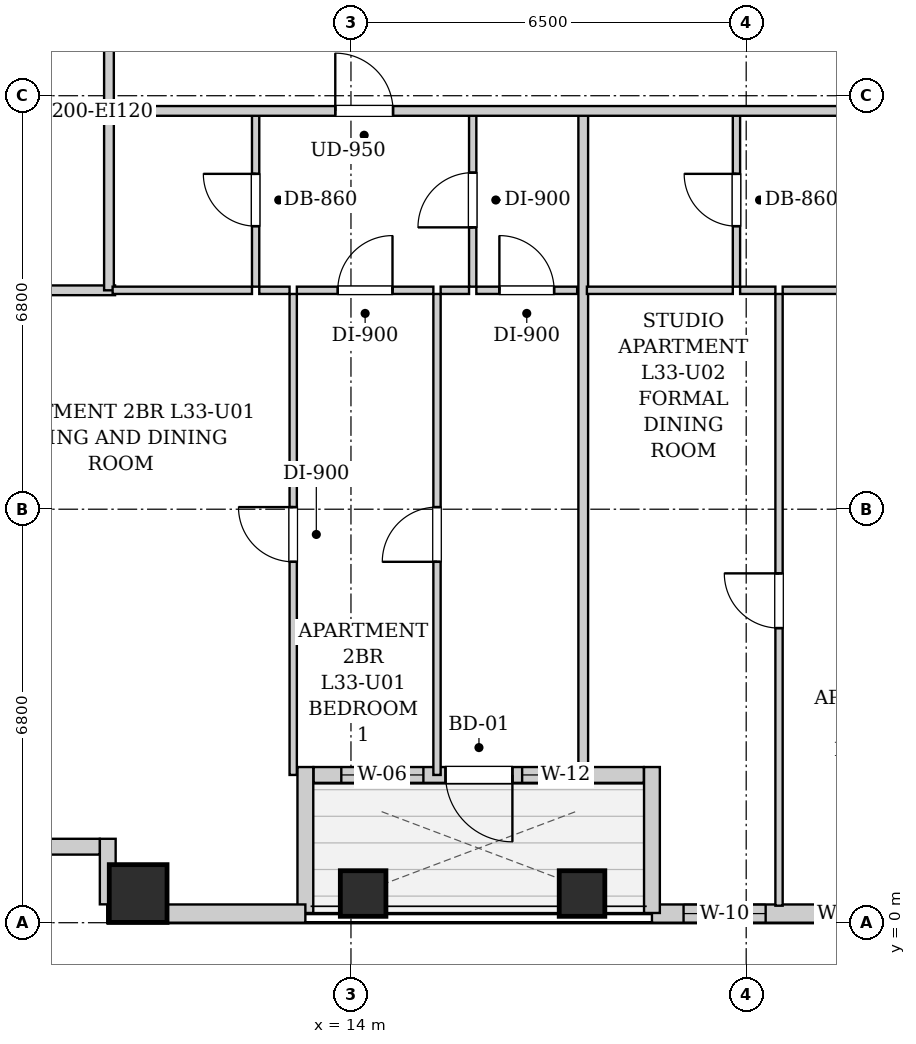
"""IFC4 building model, lengths in metres.
Left out: names, types, materials, properties, quantities, classifications, styles, units other than length and angle.
Written with IfcOpenShell. Run it as: python <this file> out.ifc"""

import sys

from ifc_helpers import new_model, si_unit, direction, frame, frame_2d, origin, origin_2d, place, context, subcontext, project, spatial, rectangle, extrude, element, fill, save


model = new_model("IFC4")
c1 = context("Model", 3, precision=1e-05, world=origin(), true_north=direction((0.0, 1.0)))
c2 = subcontext(c1, "Body", "Model", "MODEL_VIEW")
j1 = project(units=[si_unit("LENGTHUNIT", "METRE"), si_unit("PLANEANGLEUNIT", "RADIAN")], contexts=[c1])
p1 = place(None, origin())
s1 = spatial("IfcSite", under=j1, at=p1, CompositionType="ELEMENT")
p2 = place(p1, origin())
s2 = spatial("IfcBuilding", under=s1, at=p2, CompositionType="ELEMENT")
p3 = place(p2, frame((0.0, 0.0, 116.7)))
s3 = spatial("IfcBuildingStorey", under=s2, at=p3, CompositionType="ELEMENT", Elevation=116.7)
p4 = place(p3, frame((10.5, 0.48, 0.0), z_axis=(0.0, 0.0, 1.0), x_axis=(1.0, 0.0, 0.0)))
e1 = element("IfcColumn", 1, at=p4, inside=s3, PredefinedType="COLUMN", context=c2, shape_type="SweptSolid", body=[
    extrude(rectangle(XDim=0.95, YDim=0.95, at=origin_2d()), origin(), (0.0, 0.0, 1.0), 3.2),
])
for number, where, z_axis, x_axis in (
    (2, (14.2, 0.48, 0.0), (0.0, 0.0, 1.0), (1.0, 0.0, 0.0)),
    (3, (17.8, 0.48, 0.0), (0.0, 0.0, 1.0), (1.0, 0.0, 0.0)),
):
    element("IfcColumn", number, at=place(p3, frame(where, z_axis=z_axis, x_axis=x_axis)), inside=s3, PredefinedType="COLUMN", context=c2, shape_type="SweptSolid", body=[
        extrude(rectangle(XDim=0.75, YDim=0.75, at=origin_2d()), origin(), (0.0, 0.0, 1.0), 3.2),
    ])
p5 = place(p3, frame((40.9, 0.15, 0.0), z_axis=(0.0, 0.0, 1.0), x_axis=(-1.0, 0.0, 0.0)))
e4 = element("IfcWall", 4, at=p5, inside=s3, PredefinedType="SOLIDWALL", context=c2, shape_type="SweptSolid", body=[
    extrude(rectangle(XDim=21.95, YDim=0.3, at=frame_2d((10.975, 0.0))), origin(), (0.0, 0.0, 1.0), 2.88),
])
p6 = place(p5, frame((20.08, 0.0, 0.55)))
e5 = element("IfcOpeningElement", 5, at=p6, cuts=e4, PredefinedType="OPENING", context=c2, shape_type="SweptSolid", body=[
    extrude(rectangle(XDim=1.35, YDim=1.2, at=frame_2d((0.675, 0.6))), frame((0.0, 0.16, 0.0), z_axis=(0.0, -1.0, 0.0), x_axis=(1.0, 0.0, 0.0)), (0.0, 0.0, 1.0), 0.32),
])
p7 = place(p5, frame((18.4, 0.0, 0.55)))
e6 = element("IfcOpeningElement", 6, at=p7, cuts=e4, PredefinedType="OPENING", context=c2, shape_type="SweptSolid", body=[
    extrude(rectangle(XDim=0.85, YDim=1.2, at=frame_2d((0.425, 0.6))), frame((0.0, 0.16, 0.0), z_axis=(0.0, -1.0, 0.0), x_axis=(1.0, 0.0, 0.0)), (0.0, 0.0, 1.0), 0.32),
])
p8 = place(p5, frame((11.127, 0.0, 0.55)))
e7 = element("IfcOpeningElement", 7, at=p8, cuts=e4, PredefinedType="OPENING", context=c2, shape_type="SweptSolid", body=[
    extrude(rectangle(XDim=1.35, YDim=1.2, at=frame_2d((0.675, 0.6))), frame((0.0, 0.16, 0.0), z_axis=(0.0, -1.0, 0.0), x_axis=(1.0, 0.0, 0.0)), (0.0, 0.0, 1.0), 0.32),
])
p9 = place(p5, frame((8.235, 0.0, 0.55)))
e8 = element("IfcOpeningElement", 8, at=p9, cuts=e4, PredefinedType="OPENING", context=c2, shape_type="SweptSolid", body=[
    extrude(rectangle(XDim=1.35, YDim=1.2, at=frame_2d((0.675, 0.6))), frame((0.0, 0.16, 0.0), z_axis=(0.0, -1.0, 0.0), x_axis=(1.0, 0.0, 0.0)), (0.0, 0.0, 1.0), 0.32),
])
p10 = place(p5, frame((4.835, 0.0, 0.55)))
e9 = element("IfcOpeningElement", 9, at=p10, cuts=e4, PredefinedType="OPENING", context=c2, shape_type="SweptSolid", body=[
    extrude(rectangle(XDim=1.35, YDim=1.2, at=frame_2d((0.675, 0.6))), frame((0.0, 0.16, 0.0), z_axis=(0.0, -1.0, 0.0), x_axis=(1.0, 0.0, 0.0)), (0.0, 0.0, 1.0), 0.32),
])
p11 = place(p3, frame((18.95, 0.16, 0.0), z_axis=(0.0, 0.0, 1.0), x_axis=(0.0, 1.0, 0.0)))
e10 = element("IfcWall", 10, at=p11, inside=s3, PredefinedType="SOLIDWALL", context=c2, shape_type="SweptSolid", body=[
    extrude(rectangle(XDim=2.4, YDim=0.26, at=frame_2d((1.2, 0.0))), origin(), (0.0, 0.0, 1.0), 2.88),
])
p12 = place(p3, frame((18.816, 2.43, 0.0), z_axis=(0.0, 0.0, 1.0), x_axis=(-1.0, 0.0, 0.0)))
e11 = element("IfcWall", 11, at=p12, inside=s3, PredefinedType="SOLIDWALL", context=c2, shape_type="SweptSolid", body=[
    extrude(rectangle(XDim=5.432, YDim=0.26, at=frame_2d((2.716, 0.0))), origin(), (0.0, 0.0, 1.0), 2.88),
])
p13 = place(p12, frame((2.161, 0.0, 0.0)))
e12 = element("IfcOpeningElement", 12, at=p13, cuts=e11, PredefinedType="OPENING", context=c2, shape_type="SweptSolid", body=[
    extrude(rectangle(XDim=1.1, YDim=2.0, at=frame_2d((0.55, 1.0))), frame((0.0, 0.14, 0.0), z_axis=(0.0, -1.0, 0.0), x_axis=(1.0, 0.0, 0.0)), (0.0, 0.0, 1.0), 0.28),
])
p14 = place(p12, frame((3.625, 0.0, 0.85)))
e13 = element("IfcOpeningElement", 13, at=p14, cuts=e11, PredefinedType="OPENING", context=c2, shape_type="SweptSolid", body=[
    extrude(rectangle(XDim=1.35, YDim=1.65, at=frame_2d((0.675, 0.825))), frame((0.0, 0.14, 0.0), z_axis=(0.0, -1.0, 0.0), x_axis=(1.0, 0.0, 0.0)), (0.0, 0.0, 1.0), 0.28),
])
p15 = place(p12, frame((1.321, 0.0, 0.55)))
e14 = element("IfcOpeningElement", 14, at=p15, cuts=e11, PredefinedType="OPENING", context=c2, shape_type="SweptSolid", body=[
    extrude(rectangle(XDim=0.68, YDim=1.2, at=frame_2d((0.34, 0.6))), frame((0.0, 0.14, 0.0), z_axis=(0.0, -1.0, 0.0), x_axis=(1.0, 0.0, 0.0)), (0.0, 0.0, 1.0), 0.28),
])
p16 = place(p3, frame((13.25, 2.56, 0.0), z_axis=(0.0, 0.0, 1.0), x_axis=(0.0, -1.0, 0.0)))
e15 = element("IfcWall", 15, at=p16, inside=s3, PredefinedType="SOLIDWALL", context=c2, shape_type="SweptSolid", body=[
    extrude(rectangle(XDim=2.4, YDim=0.26, at=frame_2d((1.2, 0.0))), origin(), (0.0, 0.0, 1.0), 2.88),
])
p17 = place(p3, frame((13.25, 0.15, 0.0), z_axis=(0.0, 0.0, 1.0), x_axis=(-1.0, 0.0, 0.0)))
e16 = element("IfcWall", 16, at=p17, inside=s3, PredefinedType="SOLIDWALL", context=c2, shape_type="SweptSolid", body=[
    extrude(rectangle(XDim=3.25, YDim=0.3, at=frame_2d((1.625, 0.0))), origin(), (0.0, 0.0, 1.0), 2.88),
])
p18 = place(p3, frame((10.0, 0.302, 0.0), z_axis=(0.0, 0.0, 1.0), x_axis=(0.0, 1.0, 0.0)))
e17 = element("IfcWall", 17, at=p18, inside=s3, PredefinedType="SOLIDWALL", context=c2, shape_type="SweptSolid", body=[
    extrude(rectangle(XDim=1.078, YDim=0.26, at=frame_2d((0.539, 0.0))), origin(), (0.0, 0.0, 1.0), 2.88),
])
p19 = place(p3, frame((9.868, 1.25, 0.0), z_axis=(0.0, 0.0, 1.0), x_axis=(-1.0, 0.0, 0.0)))
e18 = element("IfcWall", 18, at=p19, inside=s3, PredefinedType="SOLIDWALL", context=c2, shape_type="SweptSolid", body=[
    extrude(rectangle(XDim=1.248, YDim=0.26, at=frame_2d((0.624, 0.0))), origin(), (0.0, 0.0, 1.0), 2.88),
])
p20 = place(p3, frame((10.02, 13.35, 0.0), z_axis=(0.0, 0.0, 1.0), x_axis=(0.0, 1.0, 0.0)))
e19 = element("IfcWall", 19, at=p20, inside=s3, PredefinedType="PARTITIONING", context=c2, shape_type="SweptSolid", body=[
    extrude(rectangle(XDim=1.74, YDim=0.16, at=frame_2d((0.87, 0.0))), origin(), (0.0, 0.0, 1.0), 2.88),
])
p21 = place(p3, frame((7.78, 10.4, 0.0), z_axis=(0.0, 0.0, 1.0), x_axis=(1.0, 0.0, 0.0)))
e20 = element("IfcWall", 20, at=p21, inside=s3, PredefinedType="PARTITIONING", context=c2, shape_type="SweptSolid", body=[
    extrude(rectangle(XDim=2.34, YDim=0.16, at=frame_2d((1.17, 0.0))), origin(), (0.0, 0.0, 1.0), 2.88),
])
p22 = place(p3, frame((10.02, 10.4, 0.0), z_axis=(0.0, 0.0, 1.0), x_axis=(0.0, 1.0, 0.0)))
e21 = element("IfcWall", 21, at=p22, inside=s3, PredefinedType="PARTITIONING", context=c2, shape_type="SweptSolid", body=[
    extrude(rectangle(XDim=2.91, YDim=0.16, at=frame_2d((1.455, 0.0))), origin(), (0.0, 0.0, 1.0), 2.88),
])
p23 = place(p3, frame((12.432, 10.46, 0.0), z_axis=(0.0, 0.0, 1.0), x_axis=(0.0, 1.0, 0.0)))
e22 = element("IfcWall", 22, at=p23, inside=s3, PredefinedType="PARTITIONING", context=c2, shape_type="SweptSolid", body=[
    extrude(rectangle(XDim=2.85, YDim=0.12, at=frame_2d((1.425, 0.0))), origin(), (0.0, 0.0, 1.0), 2.88),
])
p24 = place(p23, frame((0.995, 0.0, 0.0)))
e23 = element("IfcOpeningElement", 23, at=p24, cuts=e22, PredefinedType="OPENING", context=c2, shape_type="SweptSolid", body=[
    extrude(rectangle(XDim=0.86, YDim=2.05, at=frame_2d((0.43, 1.025))), frame((0.0, 0.07, 0.0), z_axis=(0.0, -1.0, 0.0), x_axis=(1.0, 0.0, 0.0)), (0.0, 0.0, 1.0), 0.14),
])
p25 = place(p3, frame((10.08, 10.4, 0.0), z_axis=(0.0, 0.0, 1.0), x_axis=(1.0, 0.0, 0.0)))
e24 = element("IfcWall", 24, at=p25, inside=s3, PredefinedType="PARTITIONING", context=c2, shape_type="SweptSolid", body=[
    extrude(rectangle(XDim=2.292, YDim=0.12, at=frame_2d((1.146, 0.0))), origin(), (0.0, 0.0, 1.0), 2.88),
])
p26 = place(p3, frame((16.002, 10.46, 0.0), z_axis=(0.0, 0.0, 1.0), x_axis=(0.0, 1.0, 0.0)))
e25 = element("IfcWall", 25, at=p26, inside=s3, PredefinedType="PARTITIONING", context=c2, shape_type="SweptSolid", body=[
    extrude(rectangle(XDim=2.85, YDim=0.12, at=frame_2d((1.425, 0.0))), origin(), (0.0, 0.0, 1.0), 2.88),
])
p27 = place(p26, frame((0.975, 0.0, 0.0)))
e26 = element("IfcOpeningElement", 26, at=p27, cuts=e25, PredefinedType="OPENING", context=c2, shape_type="SweptSolid", body=[
    extrude(rectangle(XDim=0.9, YDim=2.05, at=frame_2d((0.45, 1.025))), frame((0.0, 0.07, 0.0), z_axis=(0.0, -1.0, 0.0), x_axis=(1.0, 0.0, 0.0)), (0.0, 0.0, 1.0), 0.14),
])
p28 = place(p3, frame((12.492, 10.4, 0.0), z_axis=(0.0, 0.0, 1.0), x_axis=(1.0, 0.0, 0.0)))
e27 = element("IfcWall", 27, at=p28, inside=s3, PredefinedType="PARTITIONING", context=c2, shape_type="SweptSolid", body=[
    extrude(rectangle(XDim=0.498, YDim=0.12, at=frame_2d((0.249, 0.0))), origin(), (0.0, 0.0, 1.0), 2.88),
])
p29 = place(p3, frame((13.11, 10.4, 0.0), z_axis=(0.0, 0.0, 1.0), x_axis=(1.0, 0.0, 0.0)))
e28 = element("IfcWall", 28, at=p29, inside=s3, PredefinedType="PARTITIONING", context=c2, shape_type="SweptSolid", body=[
    extrude(rectangle(XDim=2.245, YDim=0.12, at=frame_2d((1.123, 0.0))), origin(), (0.0, 0.0, 1.0), 2.88),
])
p30 = place(p29, frame((0.673, 0.0, 0.0)))
e29 = element("IfcOpeningElement", 29, at=p30, cuts=e28, PredefinedType="OPENING", context=c2, shape_type="SweptSolid", body=[
    extrude(rectangle(XDim=0.9, YDim=2.05, at=frame_2d((0.45, 1.025))), frame((0.0, 0.07, 0.0), z_axis=(0.0, -1.0, 0.0), x_axis=(1.0, 0.0, 0.0)), (0.0, 0.0, 1.0), 0.14),
])
p31 = place(p3, frame((15.475, 10.4, 0.0), z_axis=(0.0, 0.0, 1.0), x_axis=(1.0, 0.0, 0.0)))
e30 = element("IfcWall", 30, at=p31, inside=s3, PredefinedType="PARTITIONING", context=c2, shape_type="SweptSolid", body=[
    extrude(rectangle(XDim=0.467, YDim=0.12, at=frame_2d((0.233, 0.0))), origin(), (0.0, 0.0, 1.0), 2.88),
])
p32 = place(p3, frame((16.062, 10.4, 0.0), z_axis=(0.0, 0.0, 1.0), x_axis=(1.0, 0.0, 0.0)))
e31 = element("IfcWall", 31, at=p32, inside=s3, PredefinedType="PARTITIONING", context=c2, shape_type="SweptSolid", body=[
    extrude(rectangle(XDim=1.658, YDim=0.12, at=frame_2d((0.829, 0.0))), origin(), (0.0, 0.0, 1.0), 2.88),
])
p33 = place(p32, frame((0.379, 0.0, 0.0)))
e32 = element("IfcOpeningElement", 32, at=p33, cuts=e31, PredefinedType="OPENING", context=c2, shape_type="SweptSolid", body=[
    extrude(rectangle(XDim=0.9, YDim=2.05, at=frame_2d((0.45, 1.025))), frame((0.0, 0.07, 0.0), z_axis=(0.0, -1.0, 0.0), x_axis=(1.0, 0.0, 0.0)), (0.0, 0.0, 1.0), 0.14),
])
p34 = place(p3, frame((13.05, 2.43, 0.0), z_axis=(0.0, 0.0, 1.0), x_axis=(0.0, 1.0, 0.0)))
e33 = element("IfcWall", 33, at=p34, inside=s3, PredefinedType="PARTITIONING", context=c2, shape_type="SweptSolid", body=[
    extrude(rectangle(XDim=7.91, YDim=0.12, at=frame_2d((3.955, 0.0))), origin(), (0.0, 0.0, 1.0), 2.88),
])
p35 = place(p34, frame((3.505, 0.0, 0.0)))
e34 = element("IfcOpeningElement", 34, at=p35, cuts=e33, PredefinedType="OPENING", context=c2, shape_type="SweptSolid", body=[
    extrude(rectangle(XDim=0.9, YDim=2.05, at=frame_2d((0.45, 1.025))), frame((0.0, 0.07, 0.0), z_axis=(0.0, -1.0, 0.0), x_axis=(1.0, 0.0, 0.0)), (0.0, 0.0, 1.0), 0.14),
])
p36 = place(p3, frame((15.415, 2.43, 0.0), z_axis=(0.0, 0.0, 1.0), x_axis=(0.0, 1.0, 0.0)))
e35 = element("IfcWall", 35, at=p36, inside=s3, PredefinedType="PARTITIONING", context=c2, shape_type="SweptSolid", body=[
    extrude(rectangle(XDim=7.91, YDim=0.12, at=frame_2d((3.955, 0.0))), origin(), (0.0, 0.0, 1.0), 2.88),
])
p37 = place(p36, frame((3.505, 0.0, 0.0)))
e36 = element("IfcOpeningElement", 36, at=p37, cuts=e35, PredefinedType="OPENING", context=c2, shape_type="SweptSolid", body=[
    extrude(rectangle(XDim=0.9, YDim=2.05, at=frame_2d((0.45, 1.025))), frame((0.0, 0.07, 0.0), z_axis=(0.0, -1.0, 0.0), x_axis=(1.0, 0.0, 0.0)), (0.0, 0.0, 1.0), 0.14),
])
p38 = place(p3, frame((17.82, 2.26, 0.0), z_axis=(0.0, 0.0, 1.0), x_axis=(0.0, 1.0, 0.0)))
e37 = element("IfcWall", 37, at=p38, inside=s3, PredefinedType="PARTITIONING", context=c2, shape_type="SweptSolid", body=[
    extrude(rectangle(XDim=11.05, YDim=0.16, at=frame_2d((5.525, 0.0))), origin(), (0.0, 0.0, 1.0), 2.253),
])
p39 = place(p3, frame((20.34, 10.46, 0.0), z_axis=(0.0, 0.0, 1.0), x_axis=(0.0, 1.0, 0.0)))
e38 = element("IfcWall", 38, at=p39, inside=s3, PredefinedType="PARTITIONING", context=c2, shape_type="SweptSolid", body=[
    extrude(rectangle(XDim=2.85, YDim=0.12, at=frame_2d((1.425, 0.0))), origin(), (0.0, 0.0, 1.0), 2.88),
])
p40 = place(p39, frame((0.995, 0.0, 0.0)))
e39 = element("IfcOpeningElement", 39, at=p40, cuts=e38, PredefinedType="OPENING", context=c2, shape_type="SweptSolid", body=[
    extrude(rectangle(XDim=0.86, YDim=2.05, at=frame_2d((0.43, 1.025))), frame((0.0, 0.07, 0.0), z_axis=(0.0, -1.0, 0.0), x_axis=(1.0, 0.0, 0.0)), (0.0, 0.0, 1.0), 0.14),
])
p41 = place(p3, frame((17.88, 10.4, 0.0), z_axis=(0.0, 0.0, 1.0), x_axis=(1.0, 0.0, 0.0)))
e40 = element("IfcWall", 40, at=p41, inside=s3, PredefinedType="PARTITIONING", context=c2, shape_type="SweptSolid", body=[
    extrude(rectangle(XDim=2.4, YDim=0.12, at=frame_2d((1.2, 0.0))), origin(), (0.0, 0.0, 1.0), 2.88),
])
p42 = place(p3, frame((20.4, 10.4, 0.0), z_axis=(0.0, 0.0, 1.0), x_axis=(1.0, 0.0, 0.0)))
e41 = element("IfcWall", 41, at=p42, inside=s3, PredefinedType="PARTITIONING", context=c2, shape_type="SweptSolid", body=[
    extrude(rectangle(XDim=0.58, YDim=0.12, at=frame_2d((0.29, 0.0))), origin(), (0.0, 0.0, 1.0), 2.88),
])
p43 = place(p3, frame((21.1, 10.4, 0.0), z_axis=(0.0, 0.0, 1.0), x_axis=(1.0, 0.0, 0.0)))
e42 = element("IfcWall", 42, at=p43, inside=s3, PredefinedType="PARTITIONING", context=c2, shape_type="SweptSolid", body=[
    extrude(rectangle(XDim=3.1, YDim=0.12, at=frame_2d((1.55, 0.0))), origin(), (0.0, 0.0, 1.0), 2.88),
])
p44 = place(p43, frame((1.1, 0.0, 0.0)))
e43 = element("IfcOpeningElement", 43, at=p44, cuts=e42, PredefinedType="OPENING", context=c2, shape_type="SweptSolid", body=[
    extrude(rectangle(XDim=0.9, YDim=2.05, at=frame_2d((0.45, 1.025))), frame((0.0, 0.07, 0.0), z_axis=(0.0, -1.0, 0.0), x_axis=(1.0, 0.0, 0.0)), (0.0, 0.0, 1.0), 0.14),
])
p45 = place(p3, frame((21.04, 0.28, 0.0), z_axis=(0.0, 0.0, 1.0), x_axis=(0.0, 1.0, 0.0)))
e44 = element("IfcWall", 44, at=p45, inside=s3, PredefinedType="PARTITIONING", context=c2, shape_type="SweptSolid", body=[
    extrude(rectangle(XDim=10.06, YDim=0.12, at=frame_2d((5.03, 0.0))), origin(), (0.0, 0.0, 1.0), 2.88),
])
p46 = place(p45, frame((4.565, 0.0, 0.0)))
e45 = element("IfcOpeningElement", 45, at=p46, cuts=e44, PredefinedType="OPENING", context=c2, shape_type="SweptSolid", body=[
    extrude(rectangle(XDim=0.9, YDim=2.05, at=frame_2d((0.45, 1.025))), frame((0.0, 0.07, 0.0), z_axis=(0.0, -1.0, 0.0), x_axis=(1.0, 0.0, 0.0)), (0.0, 0.0, 1.0), 0.14),
])
p47 = place(p3, frame((10.05, 13.35, 0.0), z_axis=(0.0, 0.0, 1.0), x_axis=(1.0, 0.0, 0.0)))
e46 = element("IfcWall", 46, at=p47, inside=s3, PredefinedType="PARTITIONING", context=c2, shape_type="SweptSolid", body=[
    extrude(rectangle(XDim=30.8, YDim=0.16, at=frame_2d((15.4, 0.0))), origin(), (0.0, 0.0, 1.0), 2.88),
])
p48 = place(p47, frame((3.692, 0.0, 0.0)))
e47 = element("IfcOpeningElement", 47, at=p48, cuts=e46, PredefinedType="OPENING", context=c2, shape_type="SweptSolid", body=[
    extrude(rectangle(XDim=0.95, YDim=2.1, at=frame_2d((0.475, 1.05))), frame((0.0, 0.09, 0.0), z_axis=(0.0, -1.0, 0.0), x_axis=(1.0, 0.0, 0.0)), (0.0, 0.0, 1.0), 0.18),
])
p49 = place(p47, frame((12.095, 0.0, 0.0)))
e48 = element("IfcOpeningElement", 48, at=p49, cuts=e46, PredefinedType="OPENING", context=c2, shape_type="SweptSolid", body=[
    extrude(rectangle(XDim=0.95, YDim=2.1, at=frame_2d((0.475, 1.05))), frame((0.0, 0.09, 0.0), z_axis=(0.0, -1.0, 0.0), x_axis=(1.0, 0.0, 0.0)), (0.0, 0.0, 1.0), 0.18),
])
p50 = place(p24, origin())
e49 = element("IfcDoor", 49, at=p50, inside=s3, OperationType="SINGLE_SWING_RIGHT", PredefinedType="DOOR", context=c2, shape_type="SweptSolid", body=[
    extrude(rectangle(XDim=0.86, YDim=2.05, at=frame_2d((0.43, 1.025))), frame((0.0, 0.025, 0.0), z_axis=(0.0, -1.0, 0.0), x_axis=(1.0, 0.0, 0.0)), (0.0, 0.0, 1.0), 0.05),
])
fill(e23, e49)
p51 = place(p27, origin())
e50 = element("IfcDoor", 50, at=p51, inside=s3, OperationType="SINGLE_SWING_LEFT", PredefinedType="DOOR", context=c2, shape_type="SweptSolid", body=[
    extrude(rectangle(XDim=0.9, YDim=2.05, at=frame_2d((0.45, 1.025))), frame((0.0, 0.025, 0.0), z_axis=(0.0, -1.0, 0.0), x_axis=(1.0, 0.0, 0.0)), (0.0, 0.0, 1.0), 0.05),
])
fill(e26, e50)
p52 = place(p30, origin())
e51 = element("IfcDoor", 51, at=p52, inside=s3, OperationType="SINGLE_SWING_RIGHT", PredefinedType="DOOR", context=c2, shape_type="SweptSolid", body=[
    extrude(rectangle(XDim=0.9, YDim=2.05, at=frame_2d((0.45, 1.025))), frame((0.0, 0.025, 0.0), z_axis=(0.0, -1.0, 0.0), x_axis=(1.0, 0.0, 0.0)), (0.0, 0.0, 1.0), 0.05),
])
fill(e29, e51)
p53 = place(p33, origin())
e52 = element("IfcDoor", 52, at=p53, inside=s3, OperationType="SINGLE_SWING_LEFT", PredefinedType="DOOR", context=c2, shape_type="SweptSolid", body=[
    extrude(rectangle(XDim=0.9, YDim=2.05, at=frame_2d((0.45, 1.025))), frame((0.0, 0.025, 0.0), z_axis=(0.0, -1.0, 0.0), x_axis=(1.0, 0.0, 0.0)), (0.0, 0.0, 1.0), 0.05),
])
fill(e32, e52)
p54 = place(p35, origin())
e53 = element("IfcDoor", 53, at=p54, inside=s3, OperationType="SINGLE_SWING_RIGHT", PredefinedType="DOOR", context=c2, shape_type="SweptSolid", body=[
    extrude(rectangle(XDim=0.9, YDim=2.05, at=frame_2d((0.45, 1.025))), frame((0.0, 0.025, 0.0), z_axis=(0.0, -1.0, 0.0), x_axis=(1.0, 0.0, 0.0)), (0.0, 0.0, 1.0), 0.05),
])
fill(e34, e53)
p55 = place(p37, origin())
e54 = element("IfcDoor", 54, at=p55, inside=s3, OperationType="SINGLE_SWING_LEFT", PredefinedType="DOOR", context=c2, shape_type="SweptSolid", body=[
    extrude(rectangle(XDim=0.9, YDim=2.05, at=frame_2d((0.45, 1.025))), frame((0.0, 0.025, 0.0), z_axis=(0.0, -1.0, 0.0), x_axis=(1.0, 0.0, 0.0)), (0.0, 0.0, 1.0), 0.05),
])
fill(e36, e54)
p56 = place(p40, origin())
e55 = element("IfcDoor", 55, at=p56, inside=s3, OperationType="SINGLE_SWING_RIGHT", PredefinedType="DOOR", context=c2, shape_type="SweptSolid", body=[
    extrude(rectangle(XDim=0.86, YDim=2.05, at=frame_2d((0.43, 1.025))), frame((0.0, 0.025, 0.0), z_axis=(0.0, -1.0, 0.0), x_axis=(1.0, 0.0, 0.0)), (0.0, 0.0, 1.0), 0.05),
])
fill(e39, e55)
p57 = place(p46, origin())
e56 = element("IfcDoor", 56, at=p57, inside=s3, OperationType="SINGLE_SWING_RIGHT", PredefinedType="DOOR", context=c2, shape_type="SweptSolid", body=[
    extrude(rectangle(XDim=0.9, YDim=2.05, at=frame_2d((0.45, 1.025))), frame((0.0, 0.025, 0.0), z_axis=(0.0, -1.0, 0.0), x_axis=(1.0, 0.0, 0.0)), (0.0, 0.0, 1.0), 0.05),
])
fill(e45, e56)
p58 = place(p48, origin())
e57 = element("IfcDoor", 57, at=p58, inside=s3, OperationType="SINGLE_SWING_LEFT", PredefinedType="DOOR", context=c2, shape_type="SweptSolid", body=[
    extrude(rectangle(XDim=0.95, YDim=2.1, at=frame_2d((0.475, 1.05))), frame((0.0, 0.025, 0.0), z_axis=(0.0, -1.0, 0.0), x_axis=(1.0, 0.0, 0.0)), (0.0, 0.0, 1.0), 0.05),
])
fill(e47, e57)
p59 = place(p13, origin())
e58 = element("IfcDoor", 58, at=p59, inside=s3, OperationType="SINGLE_SWING_LEFT", PredefinedType="DOOR", context=c2, shape_type="SweptSolid", body=[
    extrude(rectangle(XDim=1.1, YDim=2.0, at=frame_2d((0.55, 1.0))), frame((0.0, 0.025, 0.0), z_axis=(0.0, -1.0, 0.0), x_axis=(1.0, 0.0, 0.0)), (0.0, 0.0, 1.0), 0.05),
])
fill(e12, e58)
p60 = place(p14, origin())
e59 = element("IfcWindow", 59, at=p60, inside=s3, PartitioningType="SINGLE_PANEL", PredefinedType="WINDOW", context=c2, shape_type="SweptSolid", body=[
    extrude(rectangle(XDim=1.35, YDim=1.65, at=frame_2d((0.675, 0.825))), frame((0.0, 0.03, 0.0), z_axis=(0.0, -1.0, 0.0), x_axis=(1.0, 0.0, 0.0)), (0.0, 0.0, 1.0), 0.06),
])
fill(e13, e59)
p61 = place(p15, origin())
e60 = element("IfcWindow", 60, at=p61, inside=s3, PartitioningType="SINGLE_PANEL", PredefinedType="WINDOW", context=c2, shape_type="SweptSolid", body=[
    extrude(rectangle(XDim=0.68, YDim=1.2, at=frame_2d((0.34, 0.6))), frame((0.0, 0.03, 0.0), z_axis=(0.0, -1.0, 0.0), x_axis=(1.0, 0.0, 0.0)), (0.0, 0.0, 1.0), 0.06),
])
fill(e14, e60)
p62 = place(p6, origin())
e61 = element("IfcWindow", 61, at=p62, inside=s3, PartitioningType="SINGLE_PANEL", PredefinedType="WINDOW", context=c2, shape_type="SweptSolid", body=[
    extrude(rectangle(XDim=1.35, YDim=1.2, at=frame_2d((0.675, 0.6))), frame((0.0, 0.03, 0.0), z_axis=(0.0, -1.0, 0.0), x_axis=(1.0, 0.0, 0.0)), (0.0, 0.0, 1.0), 0.06),
])
fill(e5, e61)
p63 = place(p7, origin())
e62 = element("IfcWindow", 62, at=p63, inside=s3, PartitioningType="SINGLE_PANEL", PredefinedType="WINDOW", context=c2, shape_type="SweptSolid", body=[
    extrude(rectangle(XDim=0.85, YDim=1.2, at=frame_2d((0.425, 0.6))), frame((0.0, 0.03, 0.0), z_axis=(0.0, -1.0, 0.0), x_axis=(1.0, 0.0, 0.0)), (0.0, 0.0, 1.0), 0.06),
])
fill(e6, e62)
save(model, sys.argv[1])
